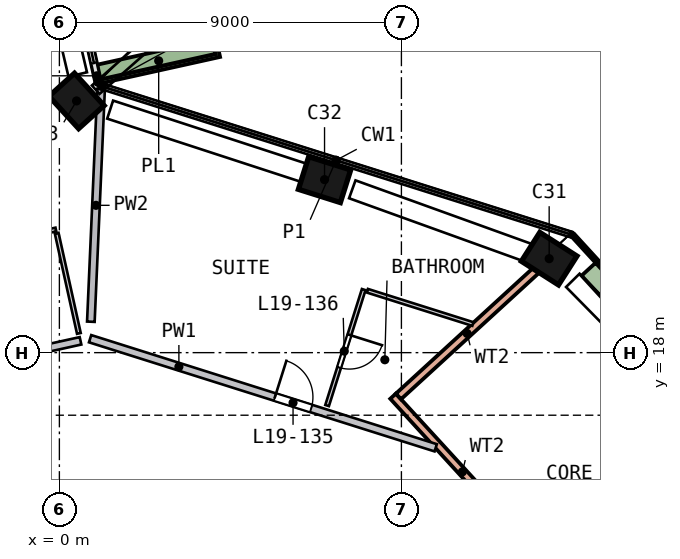
"""IFC4 building model, lengths in metres.
Left out: names, types, materials, properties, quantities, classifications, styles, units other than length and angle.
Written with IfcOpenShell. Run it as: python <this file> out.ifc"""

import sys

from ifc_helpers import new_model, si_unit, direction, frame, frame_2d, origin, origin_2d, place, context, subcontext, project, spatial, rectangle, extrude, element, fill, save


model = new_model("IFC4")
c1 = context("Model", 3, precision=1e-05, world=origin(), true_north=direction((0.0, 1.0)))
c2 = subcontext(c1, "Body", "Model", "MODEL_VIEW")
j1 = project(units=[si_unit("LENGTHUNIT", "METRE"), si_unit("PLANEANGLEUNIT", "RADIAN")], contexts=[c1])
p1 = place(None, origin())
s1 = spatial("IfcSite", under=j1, at=p1, CompositionType="ELEMENT")
p2 = place(p1, origin())
s2 = spatial("IfcBuilding", under=s1, at=p2, CompositionType="ELEMENT")
p3 = place(p2, frame((0.0, 0.0, 86.0)))
s3 = spatial("IfcBuildingStorey", under=s2, at=p3, CompositionType="ELEMENT", Elevation=86.0)
p4 = place(p3, frame((13.006, 20.399, 0.0), z_axis=(-0.097541511, 0.061048974, 0.993357275), x_axis=(0.837529173, -0.534139029, 0.115066858)))
e1 = element("IfcColumn", 1, at=p4, inside=s3, PredefinedType="COLUMN", context=c2, shape_type="SweptSolid", body=[
    extrude(rectangle(XDim=1.15, YDim=0.9, at=origin_2d()), origin(), (0.0, 0.0, 1.0), 3.211),
])
p5 = place(p3, frame((7.107, 22.513, 0.0), z_axis=(-0.107382919, 0.032929748, 0.99367225), x_axis=(-0.947501295, 0.299377243, -0.11231457)))
e2 = element("IfcColumn", 2, at=p5, inside=s3, PredefinedType="COLUMN", context=c2, shape_type="SweptSolid", body=[
    extrude(rectangle(XDim=1.15, YDim=0.9, at=origin_2d()), origin(), (0.0, 0.0, 1.0), 3.21),
])
p6 = place(p3, frame((0.593, 24.622, 0.0), z_axis=(-0.117052732, 0.001824198, 0.993124026), x_axis=(0.668179211, -0.739674625, 0.080112366)))
e3 = element("IfcColumn", 3, at=p6, inside=s3, PredefinedType="COLUMN", context=c2, shape_type="SweptSolid", body=[
    extrude(rectangle(XDim=1.15, YDim=0.9, at=origin_2d()), origin(), (0.0, 0.0, 1.0), 3.212),
])
p7 = place(p3, frame((1.016, 25.142, 0.0), z_axis=(0.0, 0.0, 1.0), x_axis=(-0.216074883, 0.976376795, 0.0)))
e4 = element("IfcWall", 4, at=p7, inside=s3, PredefinedType="SOLIDWALL", context=c2, shape_type="SweptSolid", body=[
    extrude(rectangle(XDim=3.294, YDim=0.15, at=frame_2d((1.647, 0.0))), origin(), (0.0, 0.0, 1.0), 2.425),
])
p8 = place(p7, frame((0.494, 0.0, 0.0)))
e5 = element("IfcOpeningElement", 5, at=p8, cuts=e4, PredefinedType="OPENING", context=c2, shape_type="SweptSolid", body=[
    extrude(rectangle(XDim=2.4, YDim=2.4, at=frame_2d((1.2, 1.2))), frame((0.0, 0.085, 0.0), z_axis=(0.0, -1.0, 0.0), x_axis=(1.0, 0.0, 0.0)), (0.0, 0.0, 1.0), 0.17),
])
p9 = place(p3, frame((1.051, 25.334, 0.0), z_axis=(0.0, 0.0, 1.0), x_axis=(0.976362724, 0.216138453, 0.0)))
e6 = element("IfcWall", 6, at=p9, inside=s3, PredefinedType="SOLIDWALL", context=c2, shape_type="SweptSolid", body=[
    extrude(rectangle(XDim=3.199, YDim=0.5, at=frame_2d((1.6, 0.0))), origin(), (0.0, 0.0, 1.0), 0.7),
])
p10 = place(p3, frame((8.781, 16.854, 0.0), z_axis=(0.0, 0.0, 1.0), x_axis=(0.675332489, -0.737513409, 0.0)))
e7 = element("IfcWall", 7, at=p10, inside=s3, PredefinedType="SOLIDWALL", context=c2, shape_type="SweptSolid", body=[
    extrude(rectangle(XDim=13.0, YDim=0.2, at=frame_2d((6.5, 0.0))), origin(), (0.0, 0.0, 1.0), 3.19),
])
p11 = place(p10, frame((5.6, 0.0, 0.0)))
e8 = element("IfcOpeningElement", 8, at=p11, cuts=e7, PredefinedType="OPENING", context=c2, shape_type="SweptSolid", body=[
    extrude(rectangle(XDim=1.8, YDim=2.4, at=frame_2d((0.9, 1.2))), frame((0.0, 0.11, 0.0), z_axis=(0.0, -1.0, 0.0), x_axis=(1.0, 0.0, 0.0)), (0.0, 0.0, 1.0), 0.22),
])
p12 = place(p3, frame((12.539, 20.16, 0.0), z_axis=(0.0, 0.0, 1.0), x_axis=(-0.737513614, -0.675332265, 0.0)))
e9 = element("IfcWall", 9, at=p12, inside=s3, PredefinedType="SOLIDWALL", context=c2, shape_type="SweptSolid", body=[
    extrude(rectangle(XDim=4.904, YDim=0.2, at=frame_2d((2.452, 0.0))), origin(), (0.0, 0.0, 1.0), 3.19),
])
p13 = place(p3, frame((22.19, 11.614, 0.0), z_axis=(0.0, 0.0, 1.0), x_axis=(-0.675335359, 0.737510781, 0.0)))
e10 = element("IfcWall", 10, at=p13, inside=s3, PredefinedType="SOLIDWALL", context=c2, shape_type="SweptSolid", body=[
    extrude(rectangle(XDim=12.84, YDim=0.1, at=frame_2d((6.42, 0.0))), origin(), (0.0, 0.0, 1.0), 0.7),
])
p14 = place(p3, frame((16.933, 16.91, 0.0), z_axis=(0.0, 0.0, 1.0), x_axis=(-0.675317482, 0.737527151, 0.0)))
e11 = element("IfcWall", 11, at=p14, inside=s3, PredefinedType="SOLIDWALL", context=c2, shape_type="SweptSolid", body=[
    extrude(rectangle(XDim=4.454, YDim=0.5, at=frame_2d((2.227, 0.0))), origin(), (0.0, 0.0, 1.0), 0.7),
])
p15 = place(p3, frame((0.556, 18.311, 0.0), z_axis=(0.0, 0.0, 1.0), x_axis=(-0.976362456, -0.216139663, 0.0)))
e12 = element("IfcWall", 12, at=p15, inside=s3, PredefinedType="SOLIDWALL", context=c2, shape_type="SweptSolid", body=[
    extrude(rectangle(XDim=3.4, YDim=0.2, at=frame_2d((1.7, 0.0))), origin(), (0.0, 0.0, 1.0), 3.19),
])
p16 = place(p3, frame((0.808, 18.367, 0.0), z_axis=(0.0, 0.0, 1.0), x_axis=(0.953613226, -0.301034575, 0.0)))
e13 = element("IfcWall", 13, at=p16, inside=s3, PredefinedType="SOLIDWALL", context=c2, shape_type="SweptSolid", body=[
    extrude(rectangle(XDim=9.537, YDim=0.2, at=frame_2d((4.768, 0.0))), origin(), (0.0, 0.0, 1.0), 3.19),
])
p17 = place(p16, frame((5.1, 0.0, 0.0)))
e14 = element("IfcOpeningElement", 14, at=p17, cuts=e13, PredefinedType="OPENING", context=c2, shape_type="SweptSolid", body=[
    extrude(rectangle(XDim=1.0, YDim=2.1, at=frame_2d((0.5, 1.05))), frame((0.0, 0.11, 0.0), z_axis=(0.0, -1.0, 0.0), x_axis=(1.0, 0.0, 0.0)), (0.0, 0.0, 1.0), 0.22),
])
p18 = place(p3, frame((1.098, 24.94, 0.0), z_axis=(0.0, 0.0, 1.0), x_axis=(-0.04399355, -0.999031815, 0.0)))
e15 = element("IfcWall", 15, at=p18, inside=s3, PredefinedType="SOLIDWALL", context=c2, shape_type="SweptSolid", body=[
    extrude(rectangle(XDim=6.132, YDim=0.2, at=frame_2d((3.066, 0.0))), origin(), (0.0, 0.0, 1.0), 3.19),
])
p19 = place(p3, frame((-0.092, 21.24, 0.0), z_axis=(0.0, 0.0, 1.0), x_axis=(-0.976376979, -0.216074049, 0.0)))
e16 = element("IfcWall", 16, at=p19, inside=s3, PredefinedType="PARTITIONING", context=c2, shape_type="SweptSolid", body=[
    extrude(rectangle(XDim=3.2, YDim=0.1, at=frame_2d((1.6, 0.0))), origin(), (0.0, 0.0, 1.0), 3.19),
])
p20 = place(p19, frame((1.25, 0.0, 0.0)))
e17 = element("IfcOpeningElement", 17, at=p20, cuts=e16, PredefinedType="OPENING", context=c2, shape_type="SweptSolid", body=[
    extrude(rectangle(XDim=0.9, YDim=2.1, at=frame_2d((0.45, 1.05))), frame((0.0, 0.06, 0.0), z_axis=(0.0, -1.0, 0.0), x_axis=(1.0, 0.0, 0.0)), (0.0, 0.0, 1.0), 0.12),
])
p21 = place(p3, frame((0.513, 18.506, 0.0), z_axis=(0.0, 0.0, 1.0), x_axis=(-0.216107015, 0.976369683, 0.0)))
e18 = element("IfcWall", 18, at=p21, inside=s3, PredefinedType="PARTITIONING", context=c2, shape_type="SweptSolid", body=[
    extrude(rectangle(XDim=2.7, YDim=0.1, at=frame_2d((1.35, 0.0))), origin(), (0.0, 0.0, 1.0), 3.19),
])
p22 = place(p3, frame((8.008, 19.66, 0.0), z_axis=(0.0, 0.0, 1.0), x_axis=(-0.30096706, -0.953634536, 0.0)))
e19 = element("IfcWall", 19, at=p22, inside=s3, PredefinedType="PARTITIONING", context=c2, shape_type="SweptSolid", body=[
    extrude(rectangle(XDim=3.2, YDim=0.1, at=frame_2d((1.6, 0.0))), origin(), (0.0, 0.0, 1.0), 3.19),
])
p23 = place(p22, frame((1.25, 0.0, 0.0)))
e20 = element("IfcOpeningElement", 20, at=p23, cuts=e19, PredefinedType="OPENING", context=c2, shape_type="SweptSolid", body=[
    extrude(rectangle(XDim=0.9, YDim=2.1, at=frame_2d((0.45, 1.05))), frame((0.0, 0.06, 0.0), z_axis=(0.0, -1.0, 0.0), x_axis=(1.0, 0.0, 0.0)), (0.0, 0.0, 1.0), 0.12),
])
p24 = place(p3, frame((8.104, 19.629, 0.0), z_axis=(0.0, 0.0, 1.0), x_axis=(0.953625738, -0.300994936, 0.0)))
e21 = element("IfcWall", 21, at=p24, inside=s3, PredefinedType="PARTITIONING", context=c2, shape_type="SweptSolid", body=[
    extrude(rectangle(XDim=2.912, YDim=0.1, at=frame_2d((1.456, 0.0))), origin(), (0.0, 0.0, 1.0), 3.19),
])
p25 = place(p8, origin())
e22 = element("IfcDoor", 22, at=p25, inside=s3, OperationType="SLIDING_TO_LEFT", PredefinedType="DOOR", context=c2, shape_type="SweptSolid", body=[
    extrude(rectangle(XDim=2.4, YDim=2.4, at=frame_2d((1.2, 1.2))), frame((0.0, 0.025, 0.0), z_axis=(0.0, -1.0, 0.0), x_axis=(1.0, 0.0, 0.0)), (0.0, 0.0, 1.0), 0.05),
])
fill(e5, e22)
p26 = place(p17, origin())
e23 = element("IfcDoor", 23, at=p26, inside=s3, OperationType="SINGLE_SWING_LEFT", PredefinedType="DOOR", context=c2, shape_type="SweptSolid", body=[
    extrude(rectangle(XDim=1.0, YDim=2.1, at=frame_2d((0.5, 1.05))), frame((0.0, 0.025, 0.0), z_axis=(0.0, -1.0, 0.0), x_axis=(1.0, 0.0, 0.0)), (0.0, 0.0, 1.0), 0.05),
])
fill(e14, e23)
p27 = place(p23, origin())
e24 = element("IfcDoor", 24, at=p27, inside=s3, OperationType="SINGLE_SWING_LEFT", PredefinedType="DOOR", context=c2, shape_type="SweptSolid", body=[
    extrude(rectangle(XDim=0.9, YDim=2.1, at=frame_2d((0.45, 1.05))), frame((0.0, 0.025, 0.0), z_axis=(0.0, -1.0, 0.0), x_axis=(1.0, 0.0, 0.0)), (0.0, 0.0, 1.0), 0.05),
])
fill(e20, e24)
save(model, sys.argv[1])
